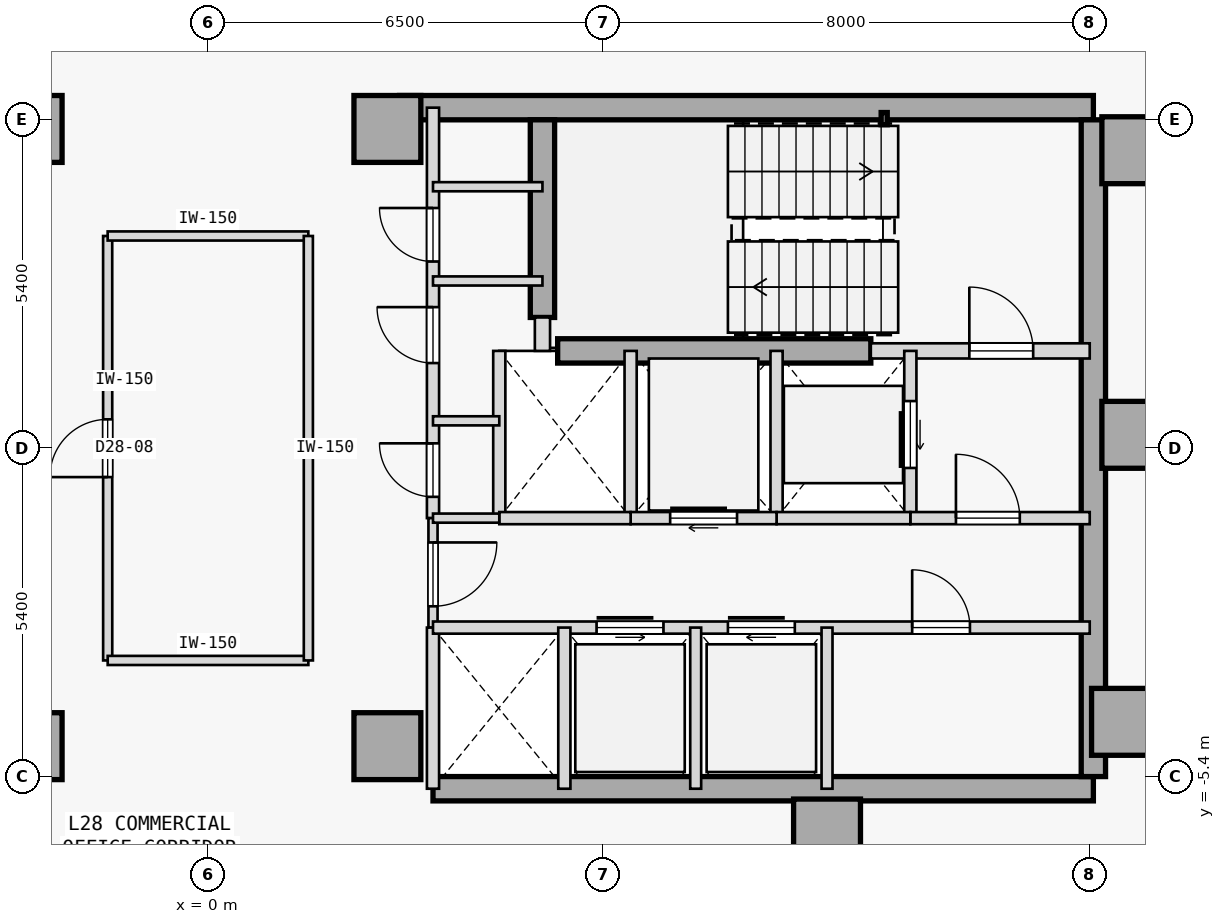
"""IFC4 building model, lengths in metres.
Left out: names, types, materials, properties, quantities, classifications, styles, units other than length and angle.
Written with IfcOpenShell. Run it as: python <this file> out.ifc"""

import sys

from ifc_helpers import new_model, si_unit, direction, frame, frame_2d, origin, origin_2d, place, context, subcontext, project, spatial, rectangle, hollow_rectangle, extrude, element, fill, save


model = new_model("IFC4")
c1 = context("Model", 3, precision=1e-05, world=origin(), true_north=direction((0.0, 1.0)))
c2 = subcontext(c1, "Body", "Model", "MODEL_VIEW")
j1 = project(units=[si_unit("LENGTHUNIT", "METRE"), si_unit("PLANEANGLEUNIT", "RADIAN")], contexts=[c1])
p1 = place(None, origin())
s1 = spatial("IfcSite", under=j1, at=p1, CompositionType="ELEMENT")
p2 = place(p1, origin())
s2 = spatial("IfcBuilding", under=s1, at=p2, CompositionType="ELEMENT")
p3 = place(p2, frame((0.0, 0.0, 113.3)))
s3 = spatial("IfcBuildingStorey", under=s2, at=p3, CompositionType="ELEMENT", Elevation=113.3)
for number, where, z_axis, x_axis in (
    (1, (-2.95, -4.9, 0.0), (0.0, 0.0, 1.0), (1.0, 0.0, 0.0)),
    (2, (-2.95, 5.25, 0.0), (0.0, 0.0, 1.0), (1.0, 0.0, 0.0)),
    (3, (15.25, 4.9, 0.0), (0.0, 0.0, 1.0), (1.0, 0.0, 0.0)),
    (4, (15.25, 0.22, 0.0), (0.0, 0.0, 1.0), (1.0, 0.0, 0.0)),
    (5, (15.08, -4.5, 0.0), (0.0, 0.0, 1.0), (1.0, 0.0, 0.0)),
    (6, (10.18, -6.32, 0.0), (0.0, 0.0, 1.0), (1.0, 0.0, 0.0)),
    (7, (2.95, -4.9, 0.0), (0.0, 0.0, 1.0), (1.0, 0.0, 0.0)),
    (8, (2.95, 5.25, 0.0), (0.0, 0.0, 1.0), (1.0, 0.0, 0.0)),
):
    element("IfcColumn", number, at=place(p3, frame(where, z_axis=z_axis, x_axis=x_axis)), inside=s3, PredefinedType="COLUMN", context=c2, shape_type="SweptSolid", body=[
        extrude(rectangle(XDim=1.1, YDim=1.1, at=origin_2d()), origin(), (0.0, 0.0, 1.0), 3.7),
    ])
p4 = place(p3, frame((3.15, 5.6, 0.0), z_axis=(0.0, 0.0, 1.0), x_axis=(1.0, 0.0, 0.0)))
e9 = element("IfcWall", 9, at=p4, inside=s3, PredefinedType="SHEAR", context=c2, shape_type="SweptSolid", body=[
    extrude(rectangle(XDim=11.41, YDim=0.4, at=frame_2d((5.705, 0.0))), origin(), (0.0, 0.0, 1.0), 3.475),
])
p5 = place(p3, frame((3.7, -5.6, 0.0), z_axis=(0.0, 0.0, 1.0), x_axis=(1.0, 0.0, 0.0)))
e10 = element("IfcWall", 10, at=p5, inside=s3, PredefinedType="SHEAR", context=c2, shape_type="SweptSolid", body=[
    extrude(rectangle(XDim=10.86, YDim=0.4, at=frame_2d((5.43, 0.0))), origin(), (0.0, 0.0, 1.0), 3.475),
])
p6 = place(p3, frame((14.56, -5.4, 0.0), z_axis=(0.0, 0.0, 1.0), x_axis=(0.0, 1.0, 0.0)))
e11 = element("IfcWall", 11, at=p6, inside=s3, PredefinedType="SHEAR", context=c2, shape_type="SweptSolid", body=[
    extrude(rectangle(XDim=10.8, YDim=0.4, at=frame_2d((5.4, 0.0))), origin(), (0.0, 0.0, 1.0), 3.475),
])
p7 = place(p3, frame((5.5, 2.15, 0.0), z_axis=(0.0, 0.0, 1.0), x_axis=(0.0, 1.0, 0.0)))
e12 = element("IfcWall", 12, at=p7, inside=s3, PredefinedType="SHEAR", context=c2, shape_type="SweptSolid", body=[
    extrude(rectangle(XDim=3.25, YDim=0.4, at=frame_2d((1.625, 0.0))), origin(), (0.0, 0.0, 1.0), 3.475),
])
p8 = place(p3, frame((5.75, 1.6, 0.0), z_axis=(0.0, 0.0, 1.0), x_axis=(1.0, 0.0, 0.0)))
e13 = element("IfcWall", 13, at=p8, inside=s3, PredefinedType="SHEAR", context=c2, shape_type="SweptSolid", body=[
    extrude(rectangle(XDim=5.15, YDim=0.4, at=frame_2d((2.575, 0.0))), origin(), (0.0, 0.0, 1.0), 3.475),
])
p9 = place(p3, frame((11.12, 5.42, 0.0), z_axis=(0.0, 0.0, 1.0), x_axis=(1.0, 0.0, 0.0)))
e14 = element("IfcColumn", 14, at=p9, inside=s3, PredefinedType="COLUMN", context=c2, shape_type="SweptSolid", body=[
    extrude(hollow_rectangle(XDim=0.1, YDim=0.2, WallThickness=0.008, at=origin_2d()), origin(), (0.0, 0.0, 1.0), 3.7),
])
p10 = place(p3, frame((10.9, 1.6, 0.0), z_axis=(0.0, 0.0, 1.0), x_axis=(1.0, 0.0, 0.0)))
e15 = element("IfcWall", 15, at=p10, inside=s3, PredefinedType="STANDARD", context=c2, shape_type="SweptSolid", body=[
    extrude(rectangle(XDim=3.6, YDim=0.25, at=frame_2d((1.8, 0.0))), origin(), (0.0, 0.0, 1.0), 3.475),
])
p11 = place(p10, frame((1.62, 0.0, 0.0)))
e16 = element("IfcOpeningElement", 16, at=p11, cuts=e15, PredefinedType="OPENING", context=c2, shape_type="SweptSolid", body=[
    extrude(rectangle(XDim=1.05, YDim=2.15, at=frame_2d((0.525, 1.075))), frame((0.0, 0.135, 0.0), z_axis=(0.0, -1.0, 0.0), x_axis=(1.0, 0.0, 0.0)), (0.0, 0.0, 1.0), 0.27),
])
p12 = place(p3, frame((5.5, 1.6, 0.0), z_axis=(0.0, 0.0, 1.0), x_axis=(0.0, 1.0, 0.0)))
e17 = element("IfcWall", 17, at=p12, inside=s3, PredefinedType="STANDARD", context=c2, shape_type="SweptSolid", body=[
    extrude(rectangle(XDim=0.55, YDim=0.25, at=frame_2d((0.275, 0.0))), origin(), (0.0, 0.0, 1.0), 3.475),
])
p13 = place(p3, frame((3.7, -1.15, 0.0), z_axis=(0.0, 0.0, 1.0), x_axis=(0.0, 1.0, 0.0)))
e18 = element("IfcWall", 18, at=p13, inside=s3, PredefinedType="STANDARD", context=c2, shape_type="SweptSolid", body=[
    extrude(rectangle(XDim=6.75, YDim=0.2, at=frame_2d((3.375, 0.0))), origin(), (0.0, 0.0, 1.0), 3.475),
])
p14 = place(p13, frame((0.35, 0.0, 0.0)))
e19 = element("IfcOpeningElement", 19, at=p14, cuts=e18, PredefinedType="OPENING", context=c2, shape_type="SweptSolid", body=[
    extrude(rectangle(XDim=0.88, YDim=2.15, at=frame_2d((0.44, 1.075))), frame((0.0, 0.11, 0.0), z_axis=(0.0, -1.0, 0.0), x_axis=(1.0, 0.0, 0.0)), (0.0, 0.0, 1.0), 0.22),
])
p15 = place(p13, frame((2.55, 0.0, 0.0)))
e20 = element("IfcOpeningElement", 20, at=p15, cuts=e18, PredefinedType="OPENING", context=c2, shape_type="SweptSolid", body=[
    extrude(rectangle(XDim=0.92, YDim=2.15, at=frame_2d((0.46, 1.075))), frame((0.0, 0.11, 0.0), z_axis=(0.0, -1.0, 0.0), x_axis=(1.0, 0.0, 0.0)), (0.0, 0.0, 1.0), 0.22),
])
p16 = place(p13, frame((4.22, 0.0, 0.0)))
e21 = element("IfcOpeningElement", 21, at=p16, cuts=e18, PredefinedType="OPENING", context=c2, shape_type="SweptSolid", body=[
    extrude(rectangle(XDim=0.88, YDim=2.15, at=frame_2d((0.44, 1.075))), frame((0.0, 0.11, 0.0), z_axis=(0.0, -1.0, 0.0), x_axis=(1.0, 0.0, 0.0)), (0.0, 0.0, 1.0), 0.22),
])
p17 = place(p3, frame((3.7, -2.95, 0.0), z_axis=(0.0, 0.0, 1.0), x_axis=(0.0, 1.0, 0.0)))
e22 = element("IfcWall", 22, at=p17, inside=s3, PredefinedType="PARTITIONING", context=c2, shape_type="SweptSolid", body=[
    extrude(rectangle(XDim=1.8, YDim=0.15, at=frame_2d((0.9, 0.0))), origin(), (0.0, 0.0, 1.0), 3.475),
])
p18 = place(p17, frame((0.35, 0.0, 0.0)))
e23 = element("IfcOpeningElement", 23, at=p18, cuts=e22, PredefinedType="OPENING", context=c2, shape_type="SweptSolid", body=[
    extrude(rectangle(XDim=1.05, YDim=2.18, at=frame_2d((0.525, 1.09))), frame((0.0, 0.085, 0.0), z_axis=(0.0, -1.0, 0.0), x_axis=(1.0, 0.0, 0.0)), (0.0, 0.0, 1.0), 0.17),
])
p19 = place(p3, frame((3.7, -5.6, 0.0), z_axis=(0.0, 0.0, 1.0), x_axis=(0.0, 1.0, 0.0)))
e24 = element("IfcWall", 24, at=p19, inside=s3, PredefinedType="STANDARD", context=c2, shape_type="SweptSolid", body=[
    extrude(rectangle(XDim=2.65, YDim=0.2, at=frame_2d((1.325, 0.0))), origin(), (0.0, 0.0, 1.0), 3.475),
])
p20 = place(p3, frame((11.55, -1.15, 0.0), z_axis=(0.0, 0.0, 1.0), x_axis=(0.0, 1.0, 0.0)))
e25 = element("IfcWall", 25, at=p20, inside=s3, PredefinedType="STANDARD", context=c2, shape_type="SweptSolid", body=[
    extrude(rectangle(XDim=2.75, YDim=0.2, at=frame_2d((1.375, 0.0))), origin(), (0.0, 0.0, 1.0), 3.475),
])
p21 = place(p20, frame((0.825, 0.0, 0.0)))
e26 = element("IfcOpeningElement", 26, at=p21, cuts=e25, PredefinedType="OPENING", context=c2, shape_type="SweptSolid", body=[
    extrude(rectangle(XDim=1.1, YDim=2.15, at=frame_2d((0.55, 1.075))), frame((0.0, 0.11, 0.0), z_axis=(0.0, -1.0, 0.0), x_axis=(1.0, 0.0, 0.0)), (0.0, 0.0, 1.0), 0.22),
])
p22 = place(p3, frame((9.35, -1.15, 0.0), z_axis=(0.0, 0.0, 1.0), x_axis=(0.0, 1.0, 0.0)))
e27 = element("IfcWall", 27, at=p22, inside=s3, PredefinedType="STANDARD", context=c2, shape_type="SweptSolid", body=[
    extrude(rectangle(XDim=2.75, YDim=0.2, at=frame_2d((1.375, 0.0))), origin(), (0.0, 0.0, 1.0), 3.475),
])
p23 = place(p3, frame((11.55, -1.15, 0.0), z_axis=(0.0, 0.0, 1.0), x_axis=(1.0, 0.0, 0.0)))
e28 = element("IfcWall", 28, at=p23, inside=s3, PredefinedType="STANDARD", context=c2, shape_type="SweptSolid", body=[
    extrude(rectangle(XDim=2.95, YDim=0.2, at=frame_2d((1.475, 0.0))), origin(), (0.0, 0.0, 1.0), 3.475),
])
p24 = place(p23, frame((0.75, 0.0, 0.0)))
e29 = element("IfcOpeningElement", 29, at=p24, cuts=e28, PredefinedType="OPENING", context=c2, shape_type="SweptSolid", body=[
    extrude(rectangle(XDim=1.05, YDim=2.18, at=frame_2d((0.525, 1.09))), frame((0.0, 0.11, 0.0), z_axis=(0.0, -1.0, 0.0), x_axis=(1.0, 0.0, 0.0)), (0.0, 0.0, 1.0), 0.22),
])
p25 = place(p3, frame((9.35, -1.15, 0.0), z_axis=(0.0, 0.0, 1.0), x_axis=(1.0, 0.0, 0.0)))
e30 = element("IfcWall", 30, at=p25, inside=s3, PredefinedType="STANDARD", context=c2, shape_type="SweptSolid", body=[
    extrude(rectangle(XDim=2.2, YDim=0.2, at=frame_2d((1.1, 0.0))), origin(), (0.0, 0.0, 1.0), 3.475),
])
p26 = place(p3, frame((6.95, -1.15, 0.0), z_axis=(0.0, 0.0, 1.0), x_axis=(0.0, 1.0, 0.0)))
e31 = element("IfcWall", 31, at=p26, inside=s3, PredefinedType="STANDARD", context=c2, shape_type="SweptSolid", body=[
    extrude(rectangle(XDim=2.75, YDim=0.2, at=frame_2d((1.375, 0.0))), origin(), (0.0, 0.0, 1.0), 3.475),
])
p27 = place(p3, frame((6.95, -1.15, 0.0), z_axis=(0.0, 0.0, 1.0), x_axis=(1.0, 0.0, 0.0)))
e32 = element("IfcWall", 32, at=p27, inside=s3, PredefinedType="STANDARD", context=c2, shape_type="SweptSolid", body=[
    extrude(rectangle(XDim=2.4, YDim=0.2, at=frame_2d((1.2, 0.0))), origin(), (0.0, 0.0, 1.0), 3.475),
])
p28 = place(p27, frame((0.65, 0.0, 0.0)))
e33 = element("IfcOpeningElement", 33, at=p28, cuts=e32, PredefinedType="OPENING", context=c2, shape_type="SweptSolid", body=[
    extrude(rectangle(XDim=1.1, YDim=2.15, at=frame_2d((0.55, 1.075))), frame((0.0, 0.11, 0.0), z_axis=(0.0, -1.0, 0.0), x_axis=(1.0, 0.0, 0.0)), (0.0, 0.0, 1.0), 0.22),
])
p29 = place(p3, frame((4.79, -1.15, 0.0), z_axis=(0.0, 0.0, 1.0), x_axis=(0.0, 1.0, 0.0)))
e34 = element("IfcWall", 34, at=p29, inside=s3, PredefinedType="STANDARD", context=c2, shape_type="SweptSolid", body=[
    extrude(rectangle(XDim=2.75, YDim=0.2, at=frame_2d((1.375, 0.0))), origin(), (0.0, 0.0, 1.0), 3.475),
])
p30 = place(p3, frame((4.79, -1.15, 0.0), z_axis=(0.0, 0.0, 1.0), x_axis=(1.0, 0.0, 0.0)))
e35 = element("IfcWall", 35, at=p30, inside=s3, PredefinedType="STANDARD", context=c2, shape_type="SweptSolid", body=[
    extrude(rectangle(XDim=2.16, YDim=0.2, at=frame_2d((1.08, 0.0))), origin(), (0.0, 0.0, 1.0), 3.475),
])
p31 = place(p3, frame((3.7, -1.15, 0.0), z_axis=(0.0, 0.0, 1.0), x_axis=(1.0, 0.0, 0.0)))
e36 = element("IfcWall", 36, at=p31, inside=s3, PredefinedType="PARTITIONING", context=c2, shape_type="SweptSolid", body=[
    extrude(rectangle(XDim=1.09, YDim=0.15, at=frame_2d((0.545, 0.0))), origin(), (0.0, 0.0, 1.0), 3.475),
])
p32 = place(p3, frame((3.7, -2.95, 0.0), z_axis=(0.0, 0.0, 1.0), x_axis=(1.0, 0.0, 0.0)))
e37 = element("IfcWall", 37, at=p32, inside=s3, PredefinedType="STANDARD", context=c2, shape_type="SweptSolid", body=[
    extrude(rectangle(XDim=10.8, YDim=0.2, at=frame_2d((5.4, 0.0))), origin(), (0.0, 0.0, 1.0), 3.475),
])
p33 = place(p32, frame((2.69, 0.0, 0.0)))
e38 = element("IfcOpeningElement", 38, at=p33, cuts=e37, PredefinedType="OPENING", context=c2, shape_type="SweptSolid", body=[
    extrude(rectangle(XDim=1.1, YDim=2.15, at=frame_2d((0.55, 1.075))), frame((0.0, 0.11, 0.0), z_axis=(0.0, -1.0, 0.0), x_axis=(1.0, 0.0, 0.0)), (0.0, 0.0, 1.0), 0.22),
])
p34 = place(p32, frame((4.85, 0.0, 0.0)))
e39 = element("IfcOpeningElement", 39, at=p34, cuts=e37, PredefinedType="OPENING", context=c2, shape_type="SweptSolid", body=[
    extrude(rectangle(XDim=1.1, YDim=2.15, at=frame_2d((0.55, 1.075))), frame((0.0, 0.11, 0.0), z_axis=(0.0, -1.0, 0.0), x_axis=(1.0, 0.0, 0.0)), (0.0, 0.0, 1.0), 0.22),
])
p35 = place(p32, frame((7.88, 0.0, 0.0)))
e40 = element("IfcOpeningElement", 40, at=p35, cuts=e37, PredefinedType="OPENING", context=c2, shape_type="SweptSolid", body=[
    extrude(rectangle(XDim=0.95, YDim=2.15, at=frame_2d((0.475, 1.075))), frame((0.0, 0.11, 0.0), z_axis=(0.0, -1.0, 0.0), x_axis=(1.0, 0.0, 0.0)), (0.0, 0.0, 1.0), 0.22),
])
p36 = place(p3, frame((5.86, -5.6, 0.0), z_axis=(0.0, 0.0, 1.0), x_axis=(0.0, 1.0, 0.0)))
e41 = element("IfcWall", 41, at=p36, inside=s3, PredefinedType="STANDARD", context=c2, shape_type="SweptSolid", body=[
    extrude(rectangle(XDim=2.65, YDim=0.2, at=frame_2d((1.325, 0.0))), origin(), (0.0, 0.0, 1.0), 3.475),
])
for number, where, z_axis, x_axis in (
    (42, (10.18, -5.6, 0.0), (0.0, 0.0, 1.0), (0.0, 1.0, 0.0)),
    (43, (8.02, -5.6, 0.0), (0.0, 0.0, 1.0), (0.0, 1.0, 0.0)),
):
    element("IfcWall", number, at=place(p3, frame(where, z_axis=z_axis, x_axis=x_axis)), inside=s3, PredefinedType="STANDARD", context=c2, shape_type="SweptSolid", body=[
        extrude(rectangle(XDim=2.65, YDim=0.18, at=frame_2d((1.325, 0.0))), origin(), (0.0, 0.0, 1.0), 3.475),
    ])
p37 = place(p3, frame((3.7, 4.3, 0.0), z_axis=(0.0, 0.0, 1.0), x_axis=(1.0, 0.0, 0.0)))
e44 = element("IfcWall", 44, at=p37, inside=s3, PredefinedType="PARTITIONING", context=c2, shape_type="SweptSolid", body=[
    extrude(rectangle(XDim=1.8, YDim=0.15, at=frame_2d((0.9, 0.0))), origin(), (0.0, 0.0, 1.0), 3.475),
])
p38 = place(p3, frame((3.7, 0.45, 0.0), z_axis=(0.0, 0.0, 1.0), x_axis=(1.0, 0.0, 0.0)))
e45 = element("IfcWall", 45, at=p38, inside=s3, PredefinedType="PARTITIONING", context=c2, shape_type="SweptSolid", body=[
    extrude(rectangle(XDim=1.09, YDim=0.15, at=frame_2d((0.545, 0.0))), origin(), (0.0, 0.0, 1.0), 3.475),
])
p39 = place(p3, frame((3.7, 2.75, 0.0), z_axis=(0.0, 0.0, 1.0), x_axis=(1.0, 0.0, 0.0)))
e46 = element("IfcWall", 46, at=p39, inside=s3, PredefinedType="PARTITIONING", context=c2, shape_type="SweptSolid", body=[
    extrude(rectangle(XDim=1.8, YDim=0.15, at=frame_2d((0.9, 0.0))), origin(), (0.0, 0.0, 1.0), 3.475),
])
p40 = place(p3, frame((-1.65, -3.49, 0.0), z_axis=(0.0, 0.0, 1.0), x_axis=(-0.000104928124, 0.999999994495, 0.0)))
e47 = element("IfcWall", 47, at=p40, inside=s3, PredefinedType="PARTITIONING", context=c2, shape_type="SweptSolid", body=[
    extrude(rectangle(XDim=6.98, YDim=0.15, at=frame_2d((3.49, 0.0))), origin(), (0.0, 0.0, 1.0), 3.475),
])
p41 = place(p40, frame((3.015, 0.0, 0.0)))
e48 = element("IfcOpeningElement", 48, at=p41, cuts=e47, PredefinedType="OPENING", context=c2, shape_type="SweptSolid", body=[
    extrude(rectangle(XDim=0.95, YDim=2.15, at=frame_2d((0.475, 1.075))), frame((0.0, 0.085, 0.0), z_axis=(0.0, -1.0, 0.0), x_axis=(1.0, 0.0, 0.0)), (0.0, 0.0, 1.0), 0.17),
])
p42 = place(p3, frame((-1.65, -3.49, 0.0), z_axis=(0.0, 0.0, 1.0), x_axis=(1.0, 0.0, 0.0)))
e49 = element("IfcWall", 49, at=p42, inside=s3, PredefinedType="PARTITIONING", context=c2, shape_type="SweptSolid", body=[
    extrude(rectangle(XDim=3.3, YDim=0.15, at=frame_2d((1.65, 0.0))), origin(), (0.0, 0.0, 1.0), 3.475),
])
p43 = place(p3, frame((-1.65, 3.49, 0.0), z_axis=(0.0, 0.0, 1.0), x_axis=(1.0, 0.0, 0.0)))
e50 = element("IfcWall", 50, at=p43, inside=s3, PredefinedType="PARTITIONING", context=c2, shape_type="SweptSolid", body=[
    extrude(rectangle(XDim=3.3, YDim=0.15, at=frame_2d((1.65, 0.0))), origin(), (0.0, 0.0, 1.0), 3.475),
])
p44 = place(p3, frame((1.65, -3.49, 0.0), z_axis=(0.0, 0.0, 1.0), x_axis=(-6.9952083e-05, 0.999999997553, 0.0)))
e51 = element("IfcWall", 51, at=p44, inside=s3, PredefinedType="PARTITIONING", context=c2, shape_type="SweptSolid", body=[
    extrude(rectangle(XDim=6.98, YDim=0.15, at=frame_2d((3.49, 0.0))), origin(), (0.0, 0.0, 1.0), 3.475),
])
p45 = place(p11, origin())
e52 = element("IfcDoor", 52, at=p45, inside=s3, OperationType="SINGLE_SWING_LEFT", PredefinedType="DOOR", context=c2, shape_type="SweptSolid", body=[
    extrude(rectangle(XDim=1.05, YDim=2.15, at=frame_2d((0.525, 1.075))), frame((0.0, 0.025, 0.0), z_axis=(0.0, -1.0, 0.0), x_axis=(1.0, 0.0, 0.0)), (0.0, 0.0, 1.0), 0.05),
])
fill(e16, e52)
p46 = place(p24, origin())
e53 = element("IfcDoor", 53, at=p46, inside=s3, OperationType="SINGLE_SWING_LEFT", PredefinedType="DOOR", context=c2, shape_type="SweptSolid", body=[
    extrude(rectangle(XDim=1.05, YDim=2.18, at=frame_2d((0.525, 1.09))), frame((0.0, 0.025, 0.0), z_axis=(0.0, -1.0, 0.0), x_axis=(1.0, 0.0, 0.0)), (0.0, 0.0, 1.0), 0.05),
])
fill(e29, e53)
p47 = place(p18, frame((1.05, 0.0, 0.0), z_axis=(0.0, 0.0, 1.0), x_axis=(-1.0, 0.0, 0.0)))
e54 = element("IfcDoor", 54, at=p47, inside=s3, OperationType="SINGLE_SWING_RIGHT", PredefinedType="DOOR", context=c2, shape_type="SweptSolid", body=[
    extrude(rectangle(XDim=1.05, YDim=2.18, at=frame_2d((0.525, 1.09))), frame((0.0, 0.025, 0.0), z_axis=(0.0, -1.0, 0.0), x_axis=(1.0, 0.0, 0.0)), (0.0, 0.0, 1.0), 0.05),
])
fill(e23, e54)
p48 = place(p21, origin())
e55 = element("IfcDoor", 55, at=p48, inside=s3, OperationType="SLIDING_TO_RIGHT", PredefinedType="DOOR", context=c2, shape_type="SweptSolid", body=[
    extrude(rectangle(XDim=1.1, YDim=2.15, at=frame_2d((0.55, 1.075))), frame((0.0, 0.025, 0.0), z_axis=(0.0, -1.0, 0.0), x_axis=(1.0, 0.0, 0.0)), (0.0, 0.0, 1.0), 0.05),
])
fill(e26, e55)
p49 = place(p28, origin())
e56 = element("IfcDoor", 56, at=p49, inside=s3, OperationType="SLIDING_TO_RIGHT", PredefinedType="DOOR", context=c2, shape_type="SweptSolid", body=[
    extrude(rectangle(XDim=1.1, YDim=2.15, at=frame_2d((0.55, 1.075))), frame((0.0, 0.025, 0.0), z_axis=(0.0, -1.0, 0.0), x_axis=(1.0, 0.0, 0.0)), (0.0, 0.0, 1.0), 0.05),
])
fill(e33, e56)
p50 = place(p33, origin())
e57 = element("IfcDoor", 57, at=p50, inside=s3, OperationType="SLIDING_TO_LEFT", PredefinedType="DOOR", context=c2, shape_type="SweptSolid", body=[
    extrude(rectangle(XDim=1.1, YDim=2.15, at=frame_2d((0.55, 1.075))), frame((0.0, 0.025, 0.0), z_axis=(0.0, -1.0, 0.0), x_axis=(1.0, 0.0, 0.0)), (0.0, 0.0, 1.0), 0.05),
])
fill(e38, e57)
p51 = place(p34, origin())
e58 = element("IfcDoor", 58, at=p51, inside=s3, OperationType="SLIDING_TO_RIGHT", PredefinedType="DOOR", context=c2, shape_type="SweptSolid", body=[
    extrude(rectangle(XDim=1.1, YDim=2.15, at=frame_2d((0.55, 1.075))), frame((0.0, 0.025, 0.0), z_axis=(0.0, -1.0, 0.0), x_axis=(1.0, 0.0, 0.0)), (0.0, 0.0, 1.0), 0.05),
])
fill(e39, e58)
p52 = place(p35, origin())
e59 = element("IfcDoor", 59, at=p52, inside=s3, OperationType="SINGLE_SWING_LEFT", PredefinedType="DOOR", context=c2, shape_type="SweptSolid", body=[
    extrude(rectangle(XDim=0.95, YDim=2.15, at=frame_2d((0.475, 1.075))), frame((0.0, 0.025, 0.0), z_axis=(0.0, -1.0, 0.0), x_axis=(1.0, 0.0, 0.0)), (0.0, 0.0, 1.0), 0.05),
])
fill(e40, e59)
p53 = place(p14, origin())
e60 = element("IfcDoor", 60, at=p53, inside=s3, OperationType="SINGLE_SWING_RIGHT", PredefinedType="DOOR", context=c2, shape_type="SweptSolid", body=[
    extrude(rectangle(XDim=0.88, YDim=2.15, at=frame_2d((0.44, 1.075))), frame((0.0, 0.025, 0.0), z_axis=(0.0, -1.0, 0.0), x_axis=(1.0, 0.0, 0.0)), (0.0, 0.0, 1.0), 0.05),
])
fill(e19, e60)
p54 = place(p15, origin())
e61 = element("IfcDoor", 61, at=p54, inside=s3, OperationType="SINGLE_SWING_RIGHT", PredefinedType="DOOR", context=c2, shape_type="SweptSolid", body=[
    extrude(rectangle(XDim=0.92, YDim=2.15, at=frame_2d((0.46, 1.075))), frame((0.0, 0.025, 0.0), z_axis=(0.0, -1.0, 0.0), x_axis=(1.0, 0.0, 0.0)), (0.0, 0.0, 1.0), 0.05),
])
fill(e20, e61)
p55 = place(p16, origin())
e62 = element("IfcDoor", 62, at=p55, inside=s3, OperationType="SINGLE_SWING_RIGHT", PredefinedType="DOOR", context=c2, shape_type="SweptSolid", body=[
    extrude(rectangle(XDim=0.88, YDim=2.15, at=frame_2d((0.44, 1.075))), frame((0.0, 0.025, 0.0), z_axis=(0.0, -1.0, 0.0), x_axis=(1.0, 0.0, 0.0)), (0.0, 0.0, 1.0), 0.05),
])
fill(e21, e62)
p56 = place(p41, origin())
e63 = element("IfcDoor", 63, at=p56, inside=s3, OperationType="SINGLE_SWING_LEFT", PredefinedType="DOOR", context=c2, shape_type="SweptSolid", body=[
    extrude(rectangle(XDim=0.95, YDim=2.15, at=frame_2d((0.475, 1.075))), frame((0.0, 0.025, 0.0), z_axis=(0.0, -1.0, 0.0), x_axis=(1.0, 0.0, 0.0)), (0.0, 0.0, 1.0), 0.05),
])
fill(e48, e63)
save(model, sys.argv[1])
